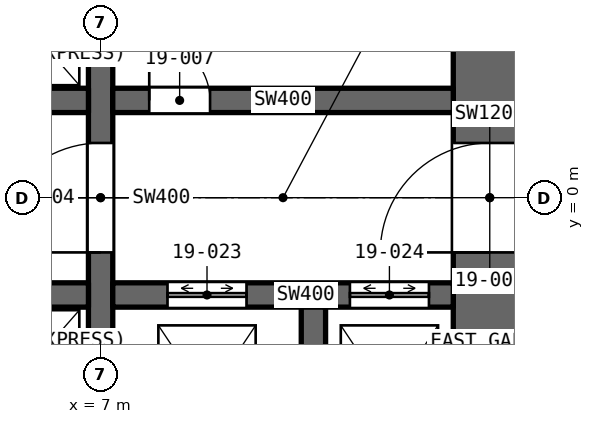
"""IFC4 building model, lengths in metres.
Left out: names, types, materials, properties, quantities, classifications, styles, units other than length and angle.
Written with IfcOpenShell. Run it as: python <this file> out.ifc"""

import sys

from ifc_helpers import new_model, si_unit, direction, frame, frame_2d, origin, place, context, subcontext, project, spatial, rectangle, extrude, element, fill, save


model = new_model("IFC4")
c1 = context("Model", 3, precision=1e-05, world=origin(), true_north=direction((0.0, 1.0)))
c2 = subcontext(c1, "Body", "Model", "MODEL_VIEW")
j1 = project(units=[si_unit("LENGTHUNIT", "METRE"), si_unit("PLANEANGLEUNIT", "RADIAN")], contexts=[c1])
p1 = place(None, origin())
s1 = spatial("IfcSite", under=j1, at=p1, CompositionType="ELEMENT")
p2 = place(p1, origin())
s2 = spatial("IfcBuilding", under=s1, at=p2, CompositionType="ELEMENT")
p3 = place(p2, frame((0.0, 0.0, 95.0)))
s3 = spatial("IfcBuildingStorey", under=s2, at=p3, CompositionType="ELEMENT", Elevation=95.0)
p4 = place(p3, frame((13.4, -8.8, 0.0), z_axis=(0.0, 0.0, 1.0), x_axis=(0.0, 1.0, 0.0)))
e1 = element("IfcWall", 1, at=p4, inside=s3, PredefinedType="SHEAR", context=c2, shape_type="SweptSolid", body=[
    extrude(rectangle(XDim=17.6, YDim=1.2, at=frame_2d((8.8, 0.0))), origin(), (0.0, 0.0, 1.0), 5.0),
])
p5 = place(p4, frame((7.9, 0.0, 0.0)))
e2 = element("IfcOpeningElement", 2, at=p5, cuts=e1, PredefinedType="OPENING", context=c2, shape_type="SweptSolid", body=[
    extrude(rectangle(XDim=1.8, YDim=2.4, at=frame_2d((0.9, 1.2))), frame((0.0, 0.61, 0.0), z_axis=(0.0, -1.0, 0.0), x_axis=(1.0, 0.0, 0.0)), (0.0, 0.0, 1.0), 1.22),
])
p6 = place(p3, frame((7.0, -8.8, 0.0), z_axis=(0.0, 0.0, 1.0), x_axis=(0.0, 1.0, 0.0)))
e3 = element("IfcWall", 3, at=p6, inside=s3, PredefinedType="SHEAR", context=c2, shape_type="SweptSolid", body=[
    extrude(rectangle(XDim=17.6, YDim=0.4, at=frame_2d((8.8, 0.0))), origin(), (0.0, 0.0, 1.0), 5.0),
])
p7 = place(p6, frame((7.9, 0.0, 0.0)))
e4 = element("IfcOpeningElement", 4, at=p7, cuts=e3, PredefinedType="OPENING", context=c2, shape_type="SweptSolid", body=[
    extrude(rectangle(XDim=1.8, YDim=2.4, at=frame_2d((0.9, 1.2))), frame((0.0, 0.21, 0.0), z_axis=(0.0, -1.0, 0.0), x_axis=(1.0, 0.0, 0.0)), (0.0, 0.0, 1.0), 0.42),
])
p8 = place(p3, frame((-6.8, 1.6, 0.0), z_axis=(0.0, 0.0, 1.0), x_axis=(1.0, 0.0, 0.0)))
e5 = element("IfcWall", 5, at=p8, inside=s3, PredefinedType="SHEAR", context=c2, shape_type="SweptSolid", body=[
    extrude(rectangle(XDim=13.6, YDim=0.4, at=frame_2d((6.8, 0.0))), origin(), (0.0, 0.0, 1.0), 5.0),
])
p9 = place(p8, frame((0.7, 0.0, 0.0)))
e6 = element("IfcOpeningElement", 6, at=p9, cuts=e5, PredefinedType="OPENING", context=c2, shape_type="SweptSolid", body=[
    extrude(rectangle(XDim=1.1, YDim=2.4, at=frame_2d((0.55, 1.2))), frame((0.0, 0.21, 0.0), z_axis=(0.0, -1.0, 0.0), x_axis=(1.0, 0.0, 0.0)), (0.0, 0.0, 1.0), 0.42),
])
p10 = place(p8, frame((3.5, 0.0, 0.0)))
e7 = element("IfcOpeningElement", 7, at=p10, cuts=e5, PredefinedType="OPENING", context=c2, shape_type="SweptSolid", body=[
    extrude(rectangle(XDim=1.1, YDim=2.4, at=frame_2d((0.55, 1.2))), frame((0.0, 0.21, 0.0), z_axis=(0.0, -1.0, 0.0), x_axis=(1.0, 0.0, 0.0)), (0.0, 0.0, 1.0), 0.42),
])
p11 = place(p8, frame((6.3, 0.0, 0.0)))
e8 = element("IfcOpeningElement", 8, at=p11, cuts=e5, PredefinedType="OPENING", context=c2, shape_type="SweptSolid", body=[
    extrude(rectangle(XDim=1.1, YDim=2.4, at=frame_2d((0.55, 1.2))), frame((0.0, 0.21, 0.0), z_axis=(0.0, -1.0, 0.0), x_axis=(1.0, 0.0, 0.0)), (0.0, 0.0, 1.0), 0.42),
])
p12 = place(p8, frame((9.1, 0.0, 0.0)))
e9 = element("IfcOpeningElement", 9, at=p12, cuts=e5, PredefinedType="OPENING", context=c2, shape_type="SweptSolid", body=[
    extrude(rectangle(XDim=1.1, YDim=2.4, at=frame_2d((0.55, 1.2))), frame((0.0, 0.21, 0.0), z_axis=(0.0, -1.0, 0.0), x_axis=(1.0, 0.0, 0.0)), (0.0, 0.0, 1.0), 0.42),
])
p13 = place(p3, frame((-6.8, -1.6, 0.0), z_axis=(0.0, 0.0, 1.0), x_axis=(1.0, 0.0, 0.0)))
e10 = element("IfcWall", 10, at=p13, inside=s3, PredefinedType="SHEAR", context=c2, shape_type="SweptSolid", body=[
    extrude(rectangle(XDim=13.6, YDim=0.4, at=frame_2d((6.8, 0.0))), origin(), (0.0, 0.0, 1.0), 5.0),
])
p14 = place(p3, frame((7.2, 1.6, 0.0), z_axis=(0.0, 0.0, 1.0), x_axis=(1.0, 0.0, 0.0)))
e11 = element("IfcWall", 11, at=p14, inside=s3, PredefinedType="SHEAR", context=c2, shape_type="SweptSolid", body=[
    extrude(rectangle(XDim=5.6, YDim=0.4, at=frame_2d((2.8, 0.0))), origin(), (0.0, 0.0, 1.0), 5.0),
])
p15 = place(p14, frame((0.6, 0.0, 0.0)))
e12 = element("IfcOpeningElement", 12, at=p15, cuts=e11, PredefinedType="OPENING", context=c2, shape_type="SweptSolid", body=[
    extrude(rectangle(XDim=1.0, YDim=2.4, at=frame_2d((0.5, 1.2))), frame((0.0, 0.21, 0.0), z_axis=(0.0, -1.0, 0.0), x_axis=(1.0, 0.0, 0.0)), (0.0, 0.0, 1.0), 0.42),
])
p16 = place(p3, frame((7.2, -1.6, 0.0), z_axis=(0.0, 0.0, 1.0), x_axis=(1.0, 0.0, 0.0)))
e13 = element("IfcWall", 13, at=p16, inside=s3, PredefinedType="SHEAR", context=c2, shape_type="SweptSolid", body=[
    extrude(rectangle(XDim=5.6, YDim=0.4, at=frame_2d((2.8, 0.0))), origin(), (0.0, 0.0, 1.0), 5.0),
])
p17 = place(p16, frame((0.9, 0.0, 0.0)))
e14 = element("IfcOpeningElement", 14, at=p17, cuts=e13, PredefinedType="OPENING", context=c2, shape_type="SweptSolid", body=[
    extrude(rectangle(XDim=1.3, YDim=2.4, at=frame_2d((0.65, 1.2))), frame((0.0, 0.21, 0.0), z_axis=(0.0, -1.0, 0.0), x_axis=(1.0, 0.0, 0.0)), (0.0, 0.0, 1.0), 0.42),
])
p18 = place(p16, frame((3.9, 0.0, 0.0)))
e15 = element("IfcOpeningElement", 15, at=p18, cuts=e13, PredefinedType="OPENING", context=c2, shape_type="SweptSolid", body=[
    extrude(rectangle(XDim=1.3, YDim=2.4, at=frame_2d((0.65, 1.2))), frame((0.0, 0.21, 0.0), z_axis=(0.0, -1.0, 0.0), x_axis=(1.0, 0.0, 0.0)), (0.0, 0.0, 1.0), 0.42),
])
p19 = place(p3, frame((10.5, -4.8, 0.0), z_axis=(0.0, 0.0, 1.0), x_axis=(0.0, 1.0, 0.0)))
e16 = element("IfcWall", 16, at=p19, inside=s3, PredefinedType="SHEAR", context=c2, shape_type="SweptSolid", body=[
    extrude(rectangle(XDim=3.0, YDim=0.4, at=frame_2d((1.5, 0.0))), origin(), (0.0, 0.0, 1.0), 5.0),
])
p20 = place(p5, origin())
e17 = element("IfcDoor", 17, at=p20, inside=s3, OperationType="DOUBLE_DOOR_SINGLE_SWING", PredefinedType="DOOR", context=c2, shape_type="SweptSolid", body=[
    extrude(rectangle(XDim=1.8, YDim=2.4, at=frame_2d((0.9, 1.2))), frame((0.0, 0.025, 0.0), z_axis=(0.0, -1.0, 0.0), x_axis=(1.0, 0.0, 0.0)), (0.0, 0.0, 1.0), 0.05),
])
fill(e2, e17)
p21 = place(p7, origin())
e18 = element("IfcDoor", 18, at=p21, inside=s3, OperationType="DOUBLE_DOOR_SINGLE_SWING", PredefinedType="DOOR", context=c2, shape_type="SweptSolid", body=[
    extrude(rectangle(XDim=1.8, YDim=2.4, at=frame_2d((0.9, 1.2))), frame((0.0, 0.025, 0.0), z_axis=(0.0, -1.0, 0.0), x_axis=(1.0, 0.0, 0.0)), (0.0, 0.0, 1.0), 0.05),
])
fill(e4, e18)
p22 = place(p15, origin())
e19 = element("IfcDoor", 19, at=p22, inside=s3, OperationType="SINGLE_SWING_LEFT", PredefinedType="DOOR", context=c2, shape_type="SweptSolid", body=[
    extrude(rectangle(XDim=1.0, YDim=2.4, at=frame_2d((0.5, 1.2))), frame((0.0, 0.025, 0.0), z_axis=(0.0, -1.0, 0.0), x_axis=(1.0, 0.0, 0.0)), (0.0, 0.0, 1.0), 0.05),
])
fill(e12, e19)
p23 = place(p17, origin())
e20 = element("IfcDoor", 20, at=p23, inside=s3, OperationType="DOUBLE_DOOR_SLIDING", PredefinedType="DOOR", context=c2, shape_type="SweptSolid", body=[
    extrude(rectangle(XDim=1.3, YDim=2.4, at=frame_2d((0.65, 1.2))), frame((0.0, 0.025, 0.0), z_axis=(0.0, -1.0, 0.0), x_axis=(1.0, 0.0, 0.0)), (0.0, 0.0, 1.0), 0.05),
])
fill(e14, e20)
p24 = place(p18, origin())
e21 = element("IfcDoor", 21, at=p24, inside=s3, OperationType="DOUBLE_DOOR_SLIDING", PredefinedType="DOOR", context=c2, shape_type="SweptSolid", body=[
    extrude(rectangle(XDim=1.3, YDim=2.4, at=frame_2d((0.65, 1.2))), frame((0.0, 0.025, 0.0), z_axis=(0.0, -1.0, 0.0), x_axis=(1.0, 0.0, 0.0)), (0.0, 0.0, 1.0), 0.05),
])
fill(e15, e21)
save(model, sys.argv[1])
